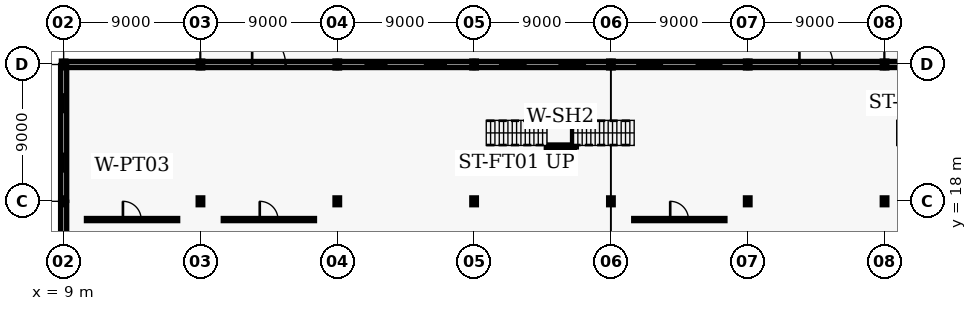
"""IFC4 building model, lengths in metres.
Left out: names, types, materials, properties, quantities, classifications, styles, units other than length and angle.
Written with IfcOpenShell. Run it as: python <this file> out.ifc"""

import sys

from ifc_helpers import new_model, si_unit, direction, frame, frame_2d, origin, origin_2d, place, context, subcontext, project, spatial, rectangle, i_section, extrude, element, fill, save


model = new_model("IFC4")
c1 = context("Model", 3, precision=1e-05, world=origin(), true_north=direction((0.0, 1.0)))
c2 = subcontext(c1, "Body", "Model", "MODEL_VIEW")
j1 = project(units=[si_unit("LENGTHUNIT", "METRE"), si_unit("PLANEANGLEUNIT", "RADIAN")], contexts=[c1])
p1 = place(None, origin())
s1 = spatial("IfcSite", under=j1, at=p1, CompositionType="ELEMENT")
p2 = place(p1, origin())
s2 = spatial("IfcBuilding", under=s1, at=p2, CompositionType="ELEMENT")
p3 = place(p2, origin())
s3 = spatial("IfcBuildingStorey", under=s2, at=p3, CompositionType="ELEMENT", Elevation=0.0)
for number, where, z_axis, x_axis in (
    (1, (9.0, 18.0, 0.0), (0.0, 0.0, 1.0), (1.0, 0.0, 0.0)),
    (2, (9.0, 27.0, 0.0), (0.0, 0.0, 1.0), (1.0, 0.0, 0.0)),
    (3, (18.0, 18.0, 0.0), (0.0, 0.0, 1.0), (1.0, 0.0, 0.0)),
    (4, (18.0, 27.0, 0.0), (0.0, 0.0, 1.0), (1.0, 0.0, 0.0)),
    (5, (27.0, 18.0, 0.0), (0.0, 0.0, 1.0), (1.0, 0.0, 0.0)),
    (6, (27.0, 27.0, 0.0), (0.0, 0.0, 1.0), (1.0, 0.0, 0.0)),
    (7, (36.0, 18.0, 0.0), (0.0, 0.0, 1.0), (1.0, 0.0, 0.0)),
    (8, (36.0, 27.0, 0.0), (0.0, 0.0, 1.0), (1.0, 0.0, 0.0)),
    (9, (45.0, 18.0, 0.0), (0.0, 0.0, 1.0), (1.0, 0.0, 0.0)),
    (10, (45.0, 27.0, 0.0), (0.0, 0.0, 1.0), (1.0, 0.0, 0.0)),
    (11, (54.0, 18.0, 0.0), (0.0, 0.0, 1.0), (1.0, 0.0, 0.0)),
    (12, (54.0, 27.0, 0.0), (0.0, 0.0, 1.0), (1.0, 0.0, 0.0)),
    (13, (63.0, 18.0, 0.0), (0.0, 0.0, 1.0), (1.0, 0.0, 0.0)),
    (14, (63.0, 27.0, 0.0), (0.0, 0.0, 1.0), (1.0, 0.0, 0.0)),
):
    element("IfcColumn", number, at=place(p3, frame(where, z_axis=z_axis, x_axis=x_axis)), inside=s3, PredefinedType="COLUMN", context=c2, shape_type="SweptSolid", body=[
        extrude(i_section(OverallWidth=0.3, OverallDepth=0.45, WebThickness=0.014, FlangeThickness=0.026, FilletRadius=0.027, at=origin_2d()), origin(), (0.0, 0.0, 1.0), 5.4),
    ])
p4 = place(p3, frame((9.06, 27.0, 0.0), z_axis=(0.0, 0.0, 1.0), x_axis=(1.0, 0.0, 0.0)))
e15 = element("IfcWall", 15, at=p4, inside=s3, PredefinedType="SOLIDWALL", context=c2, shape_type="SweptSolid", body=[
    extrude(rectangle(XDim=8.88, YDim=0.4, at=frame_2d((4.44, 0.0))), origin(), (0.0, 0.0, 1.0), 4.7),
])
p5 = place(p3, frame((18.06, 27.0, 0.0), z_axis=(0.0, 0.0, 1.0), x_axis=(1.0, 0.0, 0.0)))
e16 = element("IfcWall", 16, at=p5, inside=s3, PredefinedType="SOLIDWALL", context=c2, shape_type="SweptSolid", body=[
    extrude(rectangle(XDim=8.88, YDim=0.4, at=frame_2d((4.44, 0.0))), origin(), (0.0, 0.0, 1.0), 4.7),
])
p6 = place(p5, frame((3.34, 0.0, 0.0)))
e17 = element("IfcOpeningElement", 17, at=p6, cuts=e16, PredefinedType="OPENING", context=c2, shape_type="SweptSolid", body=[
    extrude(rectangle(XDim=2.2, YDim=2.4, at=frame_2d((1.1, 1.2))), frame((0.0, 0.21, 0.0), z_axis=(0.0, -1.0, 0.0), x_axis=(1.0, 0.0, 0.0)), (0.0, 0.0, 1.0), 0.42),
])
p7 = place(p3, frame((27.06, 27.0, 0.0), z_axis=(0.0, 0.0, 1.0), x_axis=(1.0, 0.0, 0.0)))
e18 = element("IfcWall", 18, at=p7, inside=s3, PredefinedType="SOLIDWALL", context=c2, shape_type="SweptSolid", body=[
    extrude(rectangle(XDim=8.88, YDim=0.4, at=frame_2d((4.44, 0.0))), origin(), (0.0, 0.0, 1.0), 4.7),
])
p8 = place(p7, frame((1.811, 0.0, 0.9)))
e19 = element("IfcOpeningElement", 19, at=p8, cuts=e18, PredefinedType="OPENING", context=c2, shape_type="SweptSolid", body=[
    extrude(rectangle(XDim=1.35, YDim=2.15, at=frame_2d((0.675, 1.075))), frame((0.0, 0.21, 0.0), z_axis=(0.0, -1.0, 0.0), x_axis=(1.0, 0.0, 0.0)), (0.0, 0.0, 1.0), 0.42),
])
p9 = place(p7, frame((5.719, 0.0, 0.9)))
e20 = element("IfcOpeningElement", 20, at=p9, cuts=e18, PredefinedType="OPENING", context=c2, shape_type="SweptSolid", body=[
    extrude(rectangle(XDim=1.35, YDim=2.15, at=frame_2d((0.675, 1.075))), frame((0.0, 0.21, 0.0), z_axis=(0.0, -1.0, 0.0), x_axis=(1.0, 0.0, 0.0)), (0.0, 0.0, 1.0), 0.42),
])
p10 = place(p3, frame((36.06, 27.0, 0.0), z_axis=(0.0, 0.0, 1.0), x_axis=(1.0, 0.0, 0.0)))
e21 = element("IfcWall", 21, at=p10, inside=s3, PredefinedType="SOLIDWALL", context=c2, shape_type="SweptSolid", body=[
    extrude(rectangle(XDim=8.88, YDim=0.4, at=frame_2d((4.44, 0.0))), origin(), (0.0, 0.0, 1.0), 4.7),
])
p11 = place(p10, frame((1.661, 0.0, 0.9)))
e22 = element("IfcOpeningElement", 22, at=p11, cuts=e21, PredefinedType="OPENING", context=c2, shape_type="SweptSolid", body=[
    extrude(rectangle(XDim=1.65, YDim=2.3, at=frame_2d((0.825, 1.15))), frame((0.0, 0.21, 0.0), z_axis=(0.0, -1.0, 0.0), x_axis=(1.0, 0.0, 0.0)), (0.0, 0.0, 1.0), 0.42),
])
p12 = place(p10, frame((5.569, 0.0, 0.9)))
e23 = element("IfcOpeningElement", 23, at=p12, cuts=e21, PredefinedType="OPENING", context=c2, shape_type="SweptSolid", body=[
    extrude(rectangle(XDim=1.65, YDim=2.3, at=frame_2d((0.825, 1.15))), frame((0.0, 0.21, 0.0), z_axis=(0.0, -1.0, 0.0), x_axis=(1.0, 0.0, 0.0)), (0.0, 0.0, 1.0), 0.42),
])
p13 = place(p3, frame((45.06, 27.0, 0.0), z_axis=(0.0, 0.0, 1.0), x_axis=(1.0, 0.0, 0.0)))
e24 = element("IfcWall", 24, at=p13, inside=s3, PredefinedType="SOLIDWALL", context=c2, shape_type="SweptSolid", body=[
    extrude(rectangle(XDim=8.88, YDim=0.4, at=frame_2d((4.44, 0.0))), origin(), (0.0, 0.0, 1.0), 4.7),
])
p14 = place(p13, frame((1.686, 0.0, 0.9)))
e25 = element("IfcOpeningElement", 25, at=p14, cuts=e24, PredefinedType="OPENING", context=c2, shape_type="SweptSolid", body=[
    extrude(rectangle(XDim=1.6, YDim=2.4, at=frame_2d((0.8, 1.2))), frame((0.0, 0.21, 0.0), z_axis=(0.0, -1.0, 0.0), x_axis=(1.0, 0.0, 0.0)), (0.0, 0.0, 1.0), 0.42),
])
p15 = place(p13, frame((5.594, 0.0, 0.9)))
e26 = element("IfcOpeningElement", 26, at=p15, cuts=e24, PredefinedType="OPENING", context=c2, shape_type="SweptSolid", body=[
    extrude(rectangle(XDim=1.6, YDim=2.4, at=frame_2d((0.8, 1.2))), frame((0.0, 0.21, 0.0), z_axis=(0.0, -1.0, 0.0), x_axis=(1.0, 0.0, 0.0)), (0.0, 0.0, 1.0), 0.42),
])
p16 = place(p3, frame((54.06, 27.0, 0.0), z_axis=(0.0, 0.0, 1.0), x_axis=(1.0, 0.0, 0.0)))
e27 = element("IfcWall", 27, at=p16, inside=s3, PredefinedType="SOLIDWALL", context=c2, shape_type="SweptSolid", body=[
    extrude(rectangle(XDim=8.88, YDim=0.4, at=frame_2d((4.44, 0.0))), origin(), (0.0, 0.0, 1.0), 4.7),
])
p17 = place(p16, frame((3.34, 0.0, 0.0)))
e28 = element("IfcOpeningElement", 28, at=p17, cuts=e27, PredefinedType="OPENING", context=c2, shape_type="SweptSolid", body=[
    extrude(rectangle(XDim=2.2, YDim=2.4, at=frame_2d((1.1, 1.2))), frame((0.0, 0.21, 0.0), z_axis=(0.0, -1.0, 0.0), x_axis=(1.0, 0.0, 0.0)), (0.0, 0.0, 1.0), 0.42),
])
p18 = place(p3, frame((63.06, 27.0, 0.0), z_axis=(0.0, 0.0, 1.0), x_axis=(1.0, 0.0, 0.0)))
e29 = element("IfcWall", 29, at=p18, inside=s3, PredefinedType="SOLIDWALL", context=c2, shape_type="SweptSolid", body=[
    extrude(rectangle(XDim=8.88, YDim=0.4, at=frame_2d((4.44, 0.0))), origin(), (0.0, 0.0, 1.0), 4.7),
])
p19 = place(p18, frame((1.811, 0.0, 0.9)))
e30 = element("IfcOpeningElement", 30, at=p19, cuts=e29, PredefinedType="OPENING", context=c2, shape_type="SweptSolid", body=[
    extrude(rectangle(XDim=1.35, YDim=2.15, at=frame_2d((0.675, 1.075))), frame((0.0, 0.21, 0.0), z_axis=(0.0, -1.0, 0.0), x_axis=(1.0, 0.0, 0.0)), (0.0, 0.0, 1.0), 0.42),
])
p20 = place(p18, frame((5.719, 0.0, 0.9)))
e31 = element("IfcOpeningElement", 31, at=p20, cuts=e29, PredefinedType="OPENING", context=c2, shape_type="SweptSolid", body=[
    extrude(rectangle(XDim=1.35, YDim=2.15, at=frame_2d((0.675, 1.075))), frame((0.0, 0.21, 0.0), z_axis=(0.0, -1.0, 0.0), x_axis=(1.0, 0.0, 0.0)), (0.0, 0.0, 1.0), 0.42),
])
p21 = place(p3, frame((9.0, 9.06, 0.0), z_axis=(0.0, 0.0, 1.0), x_axis=(0.0, 1.0, 0.0)))
e32 = element("IfcWall", 32, at=p21, inside=s3, PredefinedType="SOLIDWALL", context=c2, shape_type="SweptSolid", body=[
    extrude(rectangle(XDim=8.88, YDim=0.4, at=frame_2d((4.44, 0.0))), origin(), (0.0, 0.0, 1.0), 4.7),
])
p22 = place(p21, frame((3.54, 0.0, 0.0)))
e33 = element("IfcOpeningElement", 33, at=p22, cuts=e32, PredefinedType="OPENING", context=c2, shape_type="SweptSolid", body=[
    extrude(rectangle(XDim=1.8, YDim=2.2, at=frame_2d((0.9, 1.1))), frame((0.0, 0.21, 0.0), z_axis=(0.0, -1.0, 0.0), x_axis=(1.0, 0.0, 0.0)), (0.0, 0.0, 1.0), 0.42),
])
p23 = place(p3, frame((9.0, 18.06, 0.0), z_axis=(0.0, 0.0, 1.0), x_axis=(0.0, 1.0, 0.0)))
e34 = element("IfcWall", 34, at=p23, inside=s3, PredefinedType="SOLIDWALL", context=c2, shape_type="SweptSolid", body=[
    extrude(rectangle(XDim=8.88, YDim=0.4, at=frame_2d((4.44, 0.0))), origin(), (0.0, 0.0, 1.0), 4.7),
])
p24 = place(p23, frame((1.911, 0.0, 0.9)))
e35 = element("IfcOpeningElement", 35, at=p24, cuts=e34, PredefinedType="OPENING", context=c2, shape_type="SweptSolid", body=[
    extrude(rectangle(XDim=1.15, YDim=1.75, at=frame_2d((0.575, 0.875))), frame((0.0, 0.21, 0.0), z_axis=(0.0, -1.0, 0.0), x_axis=(1.0, 0.0, 0.0)), (0.0, 0.0, 1.0), 0.42),
])
p25 = place(p23, frame((5.819, 0.0, 0.9)))
e36 = element("IfcOpeningElement", 36, at=p25, cuts=e34, PredefinedType="OPENING", context=c2, shape_type="SweptSolid", body=[
    extrude(rectangle(XDim=1.15, YDim=1.75, at=frame_2d((0.575, 0.875))), frame((0.0, 0.21, 0.0), z_axis=(0.0, -1.0, 0.0), x_axis=(1.0, 0.0, 0.0)), (0.0, 0.0, 1.0), 0.42),
])
for number, where, z_axis, x_axis in (
    (37, (40.75, 21.58, 0.0), (0.0, 0.0, 1.0), (1.0, 0.0, 0.0)),
    (38, (40.75, 23.42, 0.0), (0.0, 0.0, 1.0), (1.0, 0.0, 0.0)),
):
    element("IfcWall", number, at=place(p3, frame(where, z_axis=z_axis, x_axis=x_axis)), inside=s3, PredefinedType="SHEAR", context=c2, shape_type="SweptSolid", body=[
        extrude(rectangle(XDim=1.85, YDim=0.25, at=frame_2d((0.925, 0.0))), origin(), (0.0, 0.0, 1.0), 2.46),
    ])
p26 = place(p3, frame((42.6, 21.58, 0.0), z_axis=(0.0, 0.0, 1.0), x_axis=(0.0, 1.0, 0.0)))
e39 = element("IfcWall", 39, at=p26, inside=s3, PredefinedType="SHEAR", context=c2, shape_type="SweptSolid", body=[
    extrude(rectangle(XDim=1.84, YDim=0.25, at=frame_2d((0.92, 0.0))), origin(), (0.0, 0.0, 1.0), 2.46),
])
p27 = place(p3, frame((10.5, 16.8, 0.0), z_axis=(0.0, 0.0, 1.0), x_axis=(1.0, 0.0, 0.0)))
e40 = element("IfcWall", 40, at=p27, inside=s3, PredefinedType="PARTITIONING", context=c2, shape_type="SweptSolid", body=[
    extrude(rectangle(XDim=6.0, YDim=0.14, at=frame_2d((3.0, 0.0))), origin(), (0.0, 0.0, 1.0), 4.3),
])
p28 = place(p27, frame((2.4, 0.0, 0.0)))
e41 = element("IfcOpeningElement", 41, at=p28, cuts=e40, PredefinedType="OPENING", context=c2, shape_type="SweptSolid", body=[
    extrude(rectangle(XDim=1.2, YDim=2.2, at=frame_2d((0.6, 1.1))), frame((0.0, 0.08, 0.0), z_axis=(0.0, -1.0, 0.0), x_axis=(1.0, 0.0, 0.0)), (0.0, 0.0, 1.0), 0.16),
])
p29 = place(p3, frame((19.5, 16.8, 0.0), z_axis=(0.0, 0.0, 1.0), x_axis=(1.0, 0.0, 0.0)))
e42 = element("IfcWall", 42, at=p29, inside=s3, PredefinedType="PARTITIONING", context=c2, shape_type="SweptSolid", body=[
    extrude(rectangle(XDim=6.0, YDim=0.14, at=frame_2d((3.0, 0.0))), origin(), (0.0, 0.0, 1.0), 4.3),
])
p30 = place(p29, frame((2.4, 0.0, 0.0)))
e43 = element("IfcOpeningElement", 43, at=p30, cuts=e42, PredefinedType="OPENING", context=c2, shape_type="SweptSolid", body=[
    extrude(rectangle(XDim=1.2, YDim=2.2, at=frame_2d((0.6, 1.1))), frame((0.0, 0.08, 0.0), z_axis=(0.0, -1.0, 0.0), x_axis=(1.0, 0.0, 0.0)), (0.0, 0.0, 1.0), 0.16),
])
p31 = place(p3, frame((46.5, 16.8, 0.0), z_axis=(0.0, 0.0, 1.0), x_axis=(1.0, 0.0, 0.0)))
e44 = element("IfcWall", 44, at=p31, inside=s3, PredefinedType="PARTITIONING", context=c2, shape_type="SweptSolid", body=[
    extrude(rectangle(XDim=6.0, YDim=0.14, at=frame_2d((3.0, 0.0))), origin(), (0.0, 0.0, 1.0), 4.3),
])
p32 = place(p31, frame((2.4, 0.0, 0.0)))
e45 = element("IfcOpeningElement", 45, at=p32, cuts=e44, PredefinedType="OPENING", context=c2, shape_type="SweptSolid", body=[
    extrude(rectangle(XDim=1.2, YDim=2.2, at=frame_2d((0.6, 1.1))), frame((0.0, 0.08, 0.0), z_axis=(0.0, -1.0, 0.0), x_axis=(1.0, 0.0, 0.0)), (0.0, 0.0, 1.0), 0.16),
])
p33 = place(p6, origin())
e46 = element("IfcDoor", 46, at=p33, inside=s3, OperationType="DOUBLE_DOOR_SINGLE_SWING", PredefinedType="DOOR", context=c2, shape_type="SweptSolid", body=[
    extrude(rectangle(XDim=2.2, YDim=2.4, at=frame_2d((1.1, 1.2))), frame((0.0, 0.025, 0.0), z_axis=(0.0, -1.0, 0.0), x_axis=(1.0, 0.0, 0.0)), (0.0, 0.0, 1.0), 0.05),
])
fill(e17, e46)
p34 = place(p8, origin())
e47 = element("IfcWindow", 47, at=p34, inside=s3, PartitioningType="SINGLE_PANEL", PredefinedType="WINDOW", context=c2, shape_type="SweptSolid", body=[
    extrude(rectangle(XDim=1.35, YDim=2.15, at=frame_2d((0.675, 1.075))), frame((0.0, 0.03, 0.0), z_axis=(0.0, -1.0, 0.0), x_axis=(1.0, 0.0, 0.0)), (0.0, 0.0, 1.0), 0.06),
])
fill(e19, e47)
p35 = place(p9, origin())
e48 = element("IfcWindow", 48, at=p35, inside=s3, PartitioningType="SINGLE_PANEL", PredefinedType="WINDOW", context=c2, shape_type="SweptSolid", body=[
    extrude(rectangle(XDim=1.35, YDim=2.15, at=frame_2d((0.675, 1.075))), frame((0.0, 0.03, 0.0), z_axis=(0.0, -1.0, 0.0), x_axis=(1.0, 0.0, 0.0)), (0.0, 0.0, 1.0), 0.06),
])
fill(e20, e48)
p36 = place(p11, origin())
e49 = element("IfcWindow", 49, at=p36, inside=s3, PartitioningType="SINGLE_PANEL", PredefinedType="WINDOW", context=c2, shape_type="SweptSolid", body=[
    extrude(rectangle(XDim=1.65, YDim=2.3, at=frame_2d((0.825, 1.15))), frame((0.0, 0.03, 0.0), z_axis=(0.0, -1.0, 0.0), x_axis=(1.0, 0.0, 0.0)), (0.0, 0.0, 1.0), 0.06),
])
fill(e22, e49)
p37 = place(p12, origin())
e50 = element("IfcWindow", 50, at=p37, inside=s3, PartitioningType="SINGLE_PANEL", PredefinedType="WINDOW", context=c2, shape_type="SweptSolid", body=[
    extrude(rectangle(XDim=1.65, YDim=2.3, at=frame_2d((0.825, 1.15))), frame((0.0, 0.03, 0.0), z_axis=(0.0, -1.0, 0.0), x_axis=(1.0, 0.0, 0.0)), (0.0, 0.0, 1.0), 0.06),
])
fill(e23, e50)
p38 = place(p14, origin())
e51 = element("IfcWindow", 51, at=p38, inside=s3, PartitioningType="SINGLE_PANEL", PredefinedType="WINDOW", context=c2, shape_type="SweptSolid", body=[
    extrude(rectangle(XDim=1.6, YDim=2.4, at=frame_2d((0.8, 1.2))), frame((0.0, 0.03, 0.0), z_axis=(0.0, -1.0, 0.0), x_axis=(1.0, 0.0, 0.0)), (0.0, 0.0, 1.0), 0.06),
])
fill(e25, e51)
p39 = place(p15, origin())
e52 = element("IfcWindow", 52, at=p39, inside=s3, PartitioningType="SINGLE_PANEL", PredefinedType="WINDOW", context=c2, shape_type="SweptSolid", body=[
    extrude(rectangle(XDim=1.6, YDim=2.4, at=frame_2d((0.8, 1.2))), frame((0.0, 0.03, 0.0), z_axis=(0.0, -1.0, 0.0), x_axis=(1.0, 0.0, 0.0)), (0.0, 0.0, 1.0), 0.06),
])
fill(e26, e52)
p40 = place(p17, origin())
e53 = element("IfcDoor", 53, at=p40, inside=s3, OperationType="DOUBLE_DOOR_SINGLE_SWING", PredefinedType="DOOR", context=c2, shape_type="SweptSolid", body=[
    extrude(rectangle(XDim=2.2, YDim=2.4, at=frame_2d((1.1, 1.2))), frame((0.0, 0.025, 0.0), z_axis=(0.0, -1.0, 0.0), x_axis=(1.0, 0.0, 0.0)), (0.0, 0.0, 1.0), 0.05),
])
fill(e28, e53)
p41 = place(p24, origin())
e54 = element("IfcWindow", 54, at=p41, inside=s3, PartitioningType="SINGLE_PANEL", PredefinedType="WINDOW", context=c2, shape_type="SweptSolid", body=[
    extrude(rectangle(XDim=1.15, YDim=1.75, at=frame_2d((0.575, 0.875))), frame((0.0, 0.03, 0.0), z_axis=(0.0, -1.0, 0.0), x_axis=(1.0, 0.0, 0.0)), (0.0, 0.0, 1.0), 0.06),
])
fill(e35, e54)
p42 = place(p25, origin())
e55 = element("IfcWindow", 55, at=p42, inside=s3, PartitioningType="SINGLE_PANEL", PredefinedType="WINDOW", context=c2, shape_type="SweptSolid", body=[
    extrude(rectangle(XDim=1.15, YDim=1.75, at=frame_2d((0.575, 0.875))), frame((0.0, 0.03, 0.0), z_axis=(0.0, -1.0, 0.0), x_axis=(1.0, 0.0, 0.0)), (0.0, 0.0, 1.0), 0.06),
])
fill(e36, e55)
p43 = place(p28, origin())
e56 = element("IfcDoor", 56, at=p43, inside=s3, OperationType="SINGLE_SWING_LEFT", PredefinedType="DOOR", context=c2, shape_type="SweptSolid", body=[
    extrude(rectangle(XDim=1.2, YDim=2.2, at=frame_2d((0.6, 1.1))), frame((0.0, 0.025, 0.0), z_axis=(0.0, -1.0, 0.0), x_axis=(1.0, 0.0, 0.0)), (0.0, 0.0, 1.0), 0.05),
])
fill(e41, e56)
p44 = place(p30, origin())
e57 = element("IfcDoor", 57, at=p44, inside=s3, OperationType="SINGLE_SWING_LEFT", PredefinedType="DOOR", context=c2, shape_type="SweptSolid", body=[
    extrude(rectangle(XDim=1.2, YDim=2.2, at=frame_2d((0.6, 1.1))), frame((0.0, 0.025, 0.0), z_axis=(0.0, -1.0, 0.0), x_axis=(1.0, 0.0, 0.0)), (0.0, 0.0, 1.0), 0.05),
])
fill(e43, e57)
p45 = place(p32, origin())
e58 = element("IfcDoor", 58, at=p45, inside=s3, OperationType="SINGLE_SWING_LEFT", PredefinedType="DOOR", context=c2, shape_type="SweptSolid", body=[
    extrude(rectangle(XDim=1.2, YDim=2.2, at=frame_2d((0.6, 1.1))), frame((0.0, 0.025, 0.0), z_axis=(0.0, -1.0, 0.0), x_axis=(1.0, 0.0, 0.0)), (0.0, 0.0, 1.0), 0.05),
])
fill(e45, e58)
save(model, sys.argv[1])
